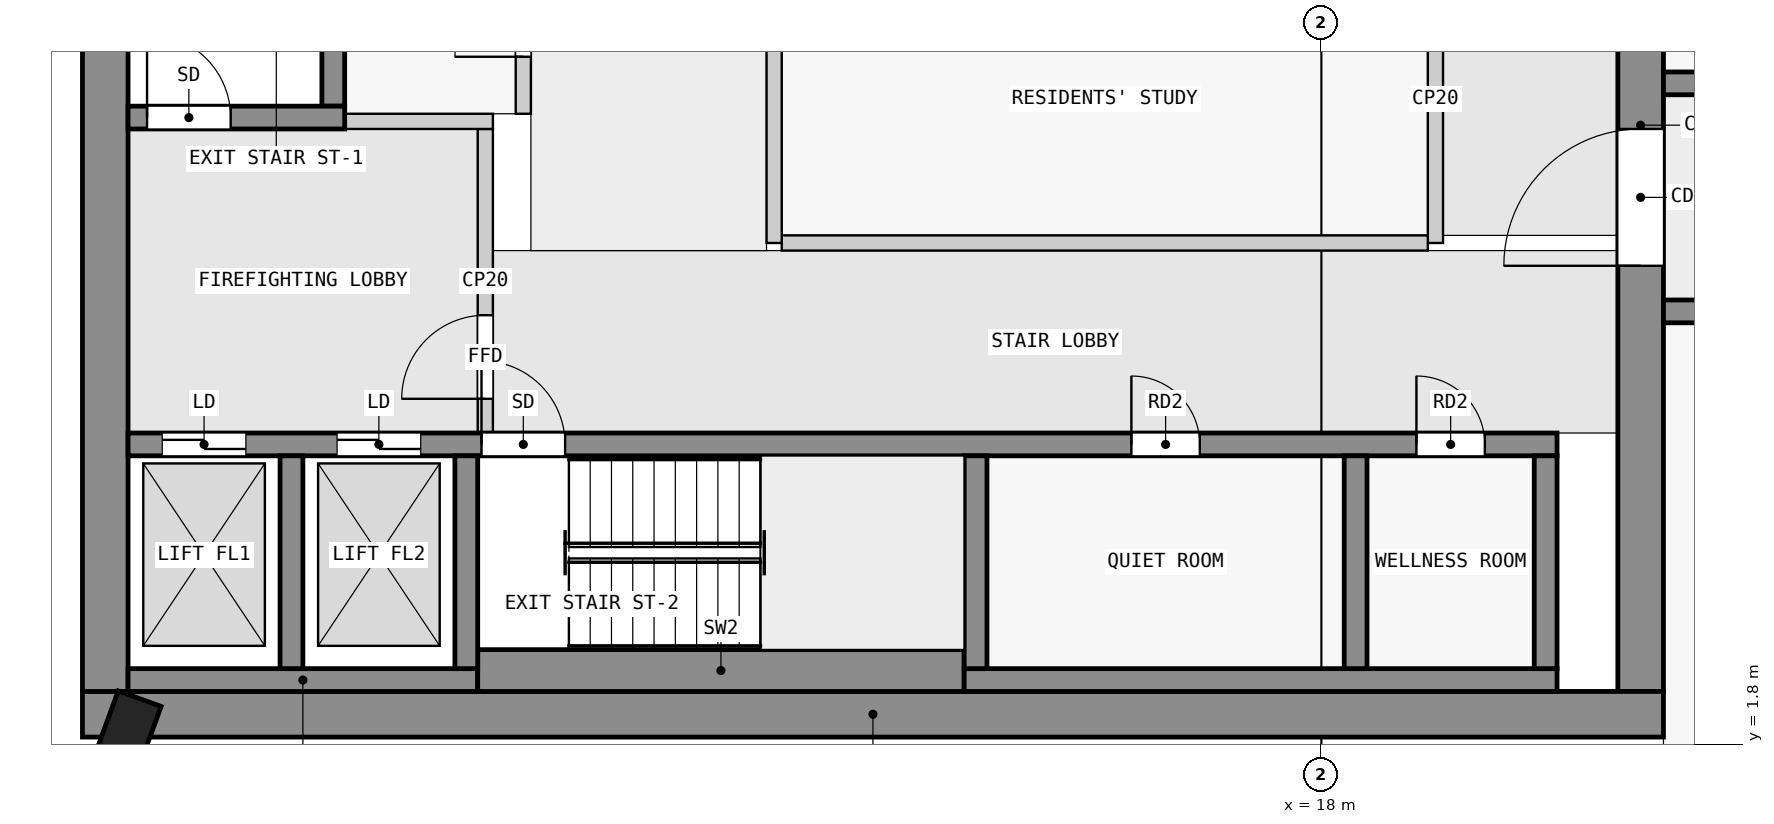
"""IFC4 building model, lengths in metres.
Left out: names, types, materials, properties, quantities, classifications, styles, units other than length and angle.
Written with IfcOpenShell. Run it as: python <this file> out.ifc"""

import sys

from ifc_helpers import new_model, si_unit, direction, frame, frame_2d, origin, origin_2d, place, context, subcontext, project, spatial, rectangle, extrude, element, fill, save


model = new_model("IFC4")
c1 = context("Model", 3, precision=1e-05, world=origin(), true_north=direction((0.0, 1.0)))
c2 = subcontext(c1, "Body", "Model", "MODEL_VIEW")
j1 = project(units=[si_unit("LENGTHUNIT", "METRE"), si_unit("PLANEANGLEUNIT", "RADIAN")], contexts=[c1])
p1 = place(None, origin())
s1 = spatial("IfcSite", under=j1, at=p1, CompositionType="ELEMENT")
p2 = place(p1, origin())
s2 = spatial("IfcBuilding", under=s1, at=p2, CompositionType="ELEMENT")
p3 = place(p2, frame((0.0, 0.0, 146.4)))
s3 = spatial("IfcBuildingStorey", under=s2, at=p3, CompositionType="ELEMENT", Elevation=146.4)
p4 = place(p3, frame((2.213, 1.748, 0.0), z_axis=(0.0, 0.0, 1.0), x_axis=(-0.939664280925, 0.342097996418, 0.0)))
e1 = element("IfcColumn", 1, at=p4, inside=s3, PredefinedType="COLUMN", context=c2, shape_type="SweptSolid", body=[
    extrude(rectangle(XDim=0.6, YDim=1.4, at=origin_2d()), origin(), (0.0, 0.0, 1.0), 3.5),
])
p5 = place(p3, frame((1.7, 2.2, 0.0), z_axis=(0.0, 0.0, 1.0), x_axis=(1.0, 0.0, 0.0)))
e2 = element("IfcWall", 2, at=p5, inside=s3, PredefinedType="SHEAR", context=c2, shape_type="SweptSolid", body=[
    extrude(rectangle(XDim=20.8, YDim=0.6, at=frame_2d((10.4, 0.0))), origin(), (0.0, 0.0, 1.0), 3.25),
])
p6 = place(p3, frame((2.0, 2.5, 0.0), z_axis=(0.0, 0.0, 1.0), x_axis=(0.0, 1.0, 0.0)))
e3 = element("IfcWall", 3, at=p6, inside=s3, PredefinedType="SHEAR", context=c2, shape_type="SweptSolid", body=[
    extrude(rectangle(XDim=14.9, YDim=0.6, at=frame_2d((7.45, 0.0))), origin(), (0.0, 0.0, 1.0), 3.25),
])
p7 = place(p3, frame((22.2, 2.5, 0.0), z_axis=(0.0, 0.0, 1.0), x_axis=(0.0, 1.0, 0.0)))
e4 = element("IfcWall", 4, at=p7, inside=s3, PredefinedType="SHEAR", context=c2, shape_type="SweptSolid", body=[
    extrude(rectangle(XDim=14.9, YDim=0.6, at=frame_2d((7.45, 0.0))), origin(), (0.0, 0.0, 1.0), 3.25),
])
p8 = place(p7, frame((5.6, 0.0, 0.0)))
e5 = element("IfcOpeningElement", 5, at=p8, cuts=e4, PredefinedType="OPENING", context=c2, shape_type="SweptSolid", body=[
    extrude(rectangle(XDim=1.8, YDim=2.1, at=frame_2d((0.9, 1.05))), frame((0.0, 0.31, 0.0), z_axis=(0.0, -1.0, 0.0), x_axis=(1.0, 0.0, 0.0)), (0.0, 0.0, 1.0), 0.62),
])
p9 = place(p3, frame((2.3, 2.65, 0.0), z_axis=(0.0, 0.0, 1.0), x_axis=(1.0, 0.0, 0.0)))
e6 = element("IfcWall", 6, at=p9, inside=s3, PredefinedType="SHEAR", context=c2, shape_type="SweptSolid", body=[
    extrude(rectangle(XDim=4.6, YDim=0.3, at=frame_2d((2.3, 0.0))), origin(), (0.0, 0.0, 1.0), 3.25),
])
p10 = place(p3, frame((6.9, 2.775, 0.0), z_axis=(0.0, 0.0, 1.0), x_axis=(1.0, 0.0, 0.0)))
e7 = element("IfcWall", 7, at=p10, inside=s3, PredefinedType="SHEAR", context=c2, shape_type="SweptSolid", body=[
    extrude(rectangle(XDim=6.4, YDim=0.55, at=frame_2d((3.2, 0.0))), origin(), (0.0, 0.0, 1.0), 3.25),
])
p11 = place(p3, frame((13.3, 2.65, 0.0), z_axis=(0.0, 0.0, 1.0), x_axis=(1.0, 0.0, 0.0)))
e8 = element("IfcWall", 8, at=p11, inside=s3, PredefinedType="SHEAR", context=c2, shape_type="SweptSolid", body=[
    extrude(rectangle(XDim=7.8, YDim=0.3, at=frame_2d((3.9, 0.0))), origin(), (0.0, 0.0, 1.0), 3.25),
])
for number, where, z_axis, x_axis in (
    (9, (4.45, 2.8, 0.0), (0.0, 0.0, 1.0), (0.0, 1.0, 0.0)),
    (10, (6.75, 2.8, 0.0), (0.0, 0.0, 1.0), (0.0, 1.0, 0.0)),
    (11, (13.45, 2.8, 0.0), (0.0, 0.0, 1.0), (0.0, 1.0, 0.0)),
    (12, (18.45, 2.8, 0.0), (0.0, 0.0, 1.0), (0.0, 1.0, 0.0)),
    (13, (20.95, 2.8, 0.0), (0.0, 0.0, 1.0), (0.0, 1.0, 0.0)),
):
    element("IfcWall", number, at=place(p3, frame(where, z_axis=z_axis, x_axis=x_axis)), inside=s3, PredefinedType="SHEAR", context=c2, shape_type="SweptSolid", body=[
        extrude(rectangle(XDim=2.8, YDim=0.3, at=frame_2d((1.4, 0.0))), origin(), (0.0, 0.0, 1.0), 3.25),
    ])
p12 = place(p3, frame((2.3, 5.75, 0.0), z_axis=(0.0, 0.0, 1.0), x_axis=(1.0, 0.0, 0.0)))
e14 = element("IfcWall", 14, at=p12, inside=s3, PredefinedType="SHEAR", context=c2, shape_type="SweptSolid", body=[
    extrude(rectangle(XDim=18.8, YDim=0.3, at=frame_2d((9.4, 0.0))), origin(), (0.0, 0.0, 1.0), 3.25),
])
p13 = place(p12, frame((4.65, 0.0, 0.0)))
e15 = element("IfcOpeningElement", 15, at=p13, cuts=e14, PredefinedType="OPENING", context=c2, shape_type="SweptSolid", body=[
    extrude(rectangle(XDim=1.1, YDim=2.1, at=frame_2d((0.55, 1.05))), frame((0.0, 0.16, 0.0), z_axis=(0.0, -1.0, 0.0), x_axis=(1.0, 0.0, 0.0)), (0.0, 0.0, 1.0), 0.32),
])
p14 = place(p12, frame((0.45, 0.0, 0.0)))
e16 = element("IfcOpeningElement", 16, at=p14, cuts=e14, PredefinedType="OPENING", context=c2, shape_type="SweptSolid", body=[
    extrude(rectangle(XDim=1.1, YDim=2.1, at=frame_2d((0.55, 1.05))), frame((0.0, 0.16, 0.0), z_axis=(0.0, -1.0, 0.0), x_axis=(1.0, 0.0, 0.0)), (0.0, 0.0, 1.0), 0.32),
])
p15 = place(p12, frame((2.75, 0.0, 0.0)))
e17 = element("IfcOpeningElement", 17, at=p15, cuts=e14, PredefinedType="OPENING", context=c2, shape_type="SweptSolid", body=[
    extrude(rectangle(XDim=1.1, YDim=2.1, at=frame_2d((0.55, 1.05))), frame((0.0, 0.16, 0.0), z_axis=(0.0, -1.0, 0.0), x_axis=(1.0, 0.0, 0.0)), (0.0, 0.0, 1.0), 0.32),
])
p16 = place(p12, frame((13.2, 0.0, 0.0)))
e18 = element("IfcOpeningElement", 18, at=p16, cuts=e14, PredefinedType="OPENING", context=c2, shape_type="SweptSolid", body=[
    extrude(rectangle(XDim=0.9, YDim=2.1, at=frame_2d((0.45, 1.05))), frame((0.0, 0.16, 0.0), z_axis=(0.0, -1.0, 0.0), x_axis=(1.0, 0.0, 0.0)), (0.0, 0.0, 1.0), 0.32),
])
p17 = place(p12, frame((16.95, 0.0, 0.0)))
e19 = element("IfcOpeningElement", 19, at=p17, cuts=e14, PredefinedType="OPENING", context=c2, shape_type="SweptSolid", body=[
    extrude(rectangle(XDim=0.9, YDim=2.1, at=frame_2d((0.45, 1.05))), frame((0.0, 0.16, 0.0), z_axis=(0.0, -1.0, 0.0), x_axis=(1.0, 0.0, 0.0)), (0.0, 0.0, 1.0), 0.32),
])
p18 = place(p3, frame((2.3, 10.05, 0.0), z_axis=(0.0, 0.0, 1.0), x_axis=(1.0, 0.0, 0.0)))
e20 = element("IfcWall", 20, at=p18, inside=s3, PredefinedType="SHEAR", context=c2, shape_type="SweptSolid", body=[
    extrude(rectangle(XDim=2.85, YDim=0.3, at=frame_2d((1.425, 0.0))), origin(), (0.0, 0.0, 1.0), 3.25),
])
p19 = place(p18, frame((0.25, 0.0, 0.0)))
e21 = element("IfcOpeningElement", 21, at=p19, cuts=e20, PredefinedType="OPENING", context=c2, shape_type="SweptSolid", body=[
    extrude(rectangle(XDim=1.1, YDim=2.1, at=frame_2d((0.55, 1.05))), frame((0.0, 0.16, 0.0), z_axis=(0.0, -1.0, 0.0), x_axis=(1.0, 0.0, 0.0)), (0.0, 0.0, 1.0), 0.32),
])
p20 = place(p3, frame((5.0, 10.2, 0.0), z_axis=(0.0, 0.0, 1.0), x_axis=(0.0, 1.0, 0.0)))
e22 = element("IfcWall", 22, at=p20, inside=s3, PredefinedType="SHEAR", context=c2, shape_type="SweptSolid", body=[
    extrude(rectangle(XDim=6.4, YDim=0.3, at=frame_2d((3.2, 0.0))), origin(), (0.0, 0.0, 1.0), 3.25),
])
p21 = place(p3, frame((22.5, 7.5, 0.0), z_axis=(0.0, 0.0, 1.0), x_axis=(1.0, 0.0, 0.0)))
e23 = element("IfcWall", 23, at=p21, inside=s3, PredefinedType="SHEAR", context=c2, shape_type="SweptSolid", body=[
    extrude(rectangle(XDim=22.5, YDim=0.3, at=frame_2d((11.25, 0.0))), origin(), (0.0, 0.0, 1.0), 3.25),
])
p22 = place(p21, frame((1.75, 0.0, 0.0)))
e24 = element("IfcOpeningElement", 24, at=p22, cuts=e23, PredefinedType="OPENING", context=c2, shape_type="SweptSolid", body=[
    extrude(rectangle(XDim=1.0, YDim=2.1, at=frame_2d((0.5, 1.05))), frame((0.0, 0.16, 0.0), z_axis=(0.0, -1.0, 0.0), x_axis=(1.0, 0.0, 0.0)), (0.0, 0.0, 1.0), 0.32),
])
p23 = place(p21, frame((6.25, 0.0, 0.0)))
e25 = element("IfcOpeningElement", 25, at=p23, cuts=e23, PredefinedType="OPENING", context=c2, shape_type="SweptSolid", body=[
    extrude(rectangle(XDim=1.0, YDim=2.1, at=frame_2d((0.5, 1.05))), frame((0.0, 0.16, 0.0), z_axis=(0.0, -1.0, 0.0), x_axis=(1.0, 0.0, 0.0)), (0.0, 0.0, 1.0), 0.32),
])
p24 = place(p21, frame((10.35, 0.0, 0.0)))
e26 = element("IfcOpeningElement", 26, at=p24, cuts=e23, PredefinedType="OPENING", context=c2, shape_type="SweptSolid", body=[
    extrude(rectangle(XDim=1.8, YDim=2.1, at=frame_2d((0.9, 1.05))), frame((0.0, 0.16, 0.0), z_axis=(0.0, -1.0, 0.0), x_axis=(1.0, 0.0, 0.0)), (0.0, 0.0, 1.0), 0.32),
])
p25 = place(p21, frame((16.85, 0.0, 0.0)))
e27 = element("IfcOpeningElement", 27, at=p25, cuts=e23, PredefinedType="OPENING", context=c2, shape_type="SweptSolid", body=[
    extrude(rectangle(XDim=1.0, YDim=2.1, at=frame_2d((0.5, 1.05))), frame((0.0, 0.16, 0.0), z_axis=(0.0, -1.0, 0.0), x_axis=(1.0, 0.0, 0.0)), (0.0, 0.0, 1.0), 0.32),
])
p26 = place(p3, frame((22.5, 10.5, 0.0), z_axis=(0.0, 0.0, 1.0), x_axis=(1.0, 0.0, 0.0)))
e28 = element("IfcWall", 28, at=p26, inside=s3, PredefinedType="SHEAR", context=c2, shape_type="SweptSolid", body=[
    extrude(rectangle(XDim=22.5, YDim=0.3, at=frame_2d((11.25, 0.0))), origin(), (0.0, 0.0, 1.0), 3.25),
])
p27 = place(p26, frame((4.05, 0.0, 0.0)))
e29 = element("IfcOpeningElement", 29, at=p27, cuts=e28, PredefinedType="OPENING", context=c2, shape_type="SweptSolid", body=[
    extrude(rectangle(XDim=1.0, YDim=2.1, at=frame_2d((0.5, 1.05))), frame((0.0, 0.16, 0.0), z_axis=(0.0, -1.0, 0.0), x_axis=(1.0, 0.0, 0.0)), (0.0, 0.0, 1.0), 0.32),
])
p28 = place(p26, frame((10.85, 0.0, 0.0)))
e30 = element("IfcOpeningElement", 30, at=p28, cuts=e28, PredefinedType="OPENING", context=c2, shape_type="SweptSolid", body=[
    extrude(rectangle(XDim=0.9, YDim=2.1, at=frame_2d((0.45, 1.05))), frame((0.0, 0.16, 0.0), z_axis=(0.0, -1.0, 0.0), x_axis=(1.0, 0.0, 0.0)), (0.0, 0.0, 1.0), 0.32),
])
p29 = place(p26, frame((15.25, 0.0, 0.0)))
e31 = element("IfcOpeningElement", 31, at=p29, cuts=e28, PredefinedType="OPENING", context=c2, shape_type="SweptSolid", body=[
    extrude(rectangle(XDim=1.0, YDim=2.1, at=frame_2d((0.5, 1.05))), frame((0.0, 0.16, 0.0), z_axis=(0.0, -1.0, 0.0), x_axis=(1.0, 0.0, 0.0)), (0.0, 0.0, 1.0), 0.32),
])
p30 = place(p26, frame((18.75, 0.0, 0.0)))
e32 = element("IfcOpeningElement", 32, at=p30, cuts=e28, PredefinedType="OPENING", context=c2, shape_type="SweptSolid", body=[
    extrude(rectangle(XDim=0.9, YDim=2.1, at=frame_2d((0.45, 1.05))), frame((0.0, 0.16, 0.0), z_axis=(0.0, -1.0, 0.0), x_axis=(1.0, 0.0, 0.0)), (0.0, 0.0, 1.0), 0.32),
])
p31 = place(p26, frame((20.95, 0.0, 0.0)))
e33 = element("IfcOpeningElement", 33, at=p31, cuts=e28, PredefinedType="OPENING", context=c2, shape_type="SweptSolid", body=[
    extrude(rectangle(XDim=1.0, YDim=2.1, at=frame_2d((0.5, 1.05))), frame((0.0, 0.16, 0.0), z_axis=(0.0, -1.0, 0.0), x_axis=(1.0, 0.0, 0.0)), (0.0, 0.0, 1.0), 0.32),
])
p32 = place(p3, frame((7.0, 5.9, 0.0), z_axis=(0.0, 0.0, 1.0), x_axis=(0.0, 1.0, 0.0)))
e34 = element("IfcWall", 34, at=p32, inside=s3, PredefinedType="PARTITIONING", context=c2, shape_type="SweptSolid", body=[
    extrude(rectangle(XDim=4.0, YDim=0.2, at=frame_2d((2.0, 0.0))), origin(), (0.0, 0.0, 1.0), 3.25),
])
p33 = place(p32, frame((0.45, 0.0, 0.0)))
e35 = element("IfcOpeningElement", 35, at=p33, cuts=e34, PredefinedType="OPENING", context=c2, shape_type="SweptSolid", body=[
    extrude(rectangle(XDim=1.1, YDim=2.1, at=frame_2d((0.55, 1.05))), frame((0.0, 0.11, 0.0), z_axis=(0.0, -1.0, 0.0), x_axis=(1.0, 0.0, 0.0)), (0.0, 0.0, 1.0), 0.22),
])
p34 = place(p3, frame((5.15, 10.0, 0.0), z_axis=(0.0, 0.0, 1.0), x_axis=(1.0, 0.0, 0.0)))
e36 = element("IfcWall", 36, at=p34, inside=s3, PredefinedType="PARTITIONING", context=c2, shape_type="SweptSolid", body=[
    extrude(rectangle(XDim=1.95, YDim=0.2, at=frame_2d((0.975, 0.0))), origin(), (0.0, 0.0, 1.0), 3.25),
])
p35 = place(p3, frame((10.8, 8.4, 0.0), z_axis=(0.0, 0.0, 1.0), x_axis=(0.0, 1.0, 0.0)))
e37 = element("IfcWall", 37, at=p35, inside=s3, PredefinedType="PARTITIONING", context=c2, shape_type="SweptSolid", body=[
    extrude(rectangle(XDim=3.8, YDim=0.2, at=frame_2d((1.9, 0.0))), origin(), (0.0, 0.0, 1.0), 3.25),
])
p36 = place(p3, frame((10.9, 8.4, 0.0), z_axis=(0.0, 0.0, 1.0), x_axis=(1.0, 0.0, 0.0)))
e38 = element("IfcWall", 38, at=p36, inside=s3, PredefinedType="PARTITIONING", context=c2, shape_type="SweptSolid", body=[
    extrude(rectangle(XDim=8.5, YDim=0.2, at=frame_2d((4.25, 0.0))), origin(), (0.0, 0.0, 1.0), 3.25),
])
p37 = place(p3, frame((19.5, 8.4, 0.0), z_axis=(0.0, 0.0, 1.0), x_axis=(0.0, 1.0, 0.0)))
e39 = element("IfcWall", 39, at=p37, inside=s3, PredefinedType="PARTITIONING", context=c2, shape_type="SweptSolid", body=[
    extrude(rectangle(XDim=3.8, YDim=0.2, at=frame_2d((1.9, 0.0))), origin(), (0.0, 0.0, 1.0), 3.25),
])
p38 = place(p3, frame((7.5, 10.1, 0.0), z_axis=(0.0, 0.0, 1.0), x_axis=(0.0, 1.0, 0.0)))
e40 = element("IfcWall", 40, at=p38, inside=s3, PredefinedType="PARTITIONING", context=c2, shape_type="SweptSolid", body=[
    extrude(rectangle(XDim=7.3, YDim=0.2, at=frame_2d((3.65, 0.0))), origin(), (0.0, 0.0, 1.0), 3.25),
])
p39 = place(p38, frame((0.75, 0.0, 0.0)))
e41 = element("IfcOpeningElement", 41, at=p39, cuts=e40, PredefinedType="OPENING", context=c2, shape_type="SweptSolid", body=[
    extrude(rectangle(XDim=0.9, YDim=2.1, at=frame_2d((0.45, 1.05))), frame((0.0, 0.11, 0.0), z_axis=(0.0, -1.0, 0.0), x_axis=(1.0, 0.0, 0.0)), (0.0, 0.0, 1.0), 0.22),
])
p40 = place(p38, frame((4.4, 0.0, 0.0)))
e42 = element("IfcOpeningElement", 42, at=p40, cuts=e40, PredefinedType="OPENING", context=c2, shape_type="SweptSolid", body=[
    extrude(rectangle(XDim=0.9, YDim=2.1, at=frame_2d((0.45, 1.05))), frame((0.0, 0.11, 0.0), z_axis=(0.0, -1.0, 0.0), x_axis=(1.0, 0.0, 0.0)), (0.0, 0.0, 1.0), 0.22),
])
p41 = place(p33, origin())
e43 = element("IfcDoor", 43, at=p41, inside=s3, OperationType="SINGLE_SWING_LEFT", PredefinedType="DOOR", context=c2, shape_type="SweptSolid", body=[
    extrude(rectangle(XDim=1.1, YDim=2.1, at=frame_2d((0.55, 1.05))), frame((0.0, 0.025, 0.0), z_axis=(0.0, -1.0, 0.0), x_axis=(1.0, 0.0, 0.0)), (0.0, 0.0, 1.0), 0.05),
])
fill(e35, e43)
p42 = place(p19, origin())
e44 = element("IfcDoor", 44, at=p42, inside=s3, OperationType="SINGLE_SWING_RIGHT", PredefinedType="DOOR", context=c2, shape_type="SweptSolid", body=[
    extrude(rectangle(XDim=1.1, YDim=2.1, at=frame_2d((0.55, 1.05))), frame((0.0, 0.025, 0.0), z_axis=(0.0, -1.0, 0.0), x_axis=(1.0, 0.0, 0.0)), (0.0, 0.0, 1.0), 0.05),
])
fill(e21, e44)
p43 = place(p13, origin())
e45 = element("IfcDoor", 45, at=p43, inside=s3, OperationType="SINGLE_SWING_LEFT", PredefinedType="DOOR", context=c2, shape_type="SweptSolid", body=[
    extrude(rectangle(XDim=1.1, YDim=2.1, at=frame_2d((0.55, 1.05))), frame((0.0, 0.025, 0.0), z_axis=(0.0, -1.0, 0.0), x_axis=(1.0, 0.0, 0.0)), (0.0, 0.0, 1.0), 0.05),
])
fill(e15, e45)
p44 = place(p14, origin())
e46 = element("IfcDoor", 46, at=p44, inside=s3, OperationType="DOUBLE_DOOR_SLIDING", PredefinedType="DOOR", context=c2, shape_type="SweptSolid", body=[
    extrude(rectangle(XDim=1.1, YDim=2.1, at=frame_2d((0.55, 1.05))), frame((0.0, 0.025, 0.0), z_axis=(0.0, -1.0, 0.0), x_axis=(1.0, 0.0, 0.0)), (0.0, 0.0, 1.0), 0.05),
])
fill(e16, e46)
p45 = place(p15, origin())
e47 = element("IfcDoor", 47, at=p45, inside=s3, OperationType="DOUBLE_DOOR_SLIDING", PredefinedType="DOOR", context=c2, shape_type="SweptSolid", body=[
    extrude(rectangle(XDim=1.1, YDim=2.1, at=frame_2d((0.55, 1.05))), frame((0.0, 0.025, 0.0), z_axis=(0.0, -1.0, 0.0), x_axis=(1.0, 0.0, 0.0)), (0.0, 0.0, 1.0), 0.05),
])
fill(e17, e47)
p46 = place(p8, origin())
e48 = element("IfcDoor", 48, at=p46, inside=s3, OperationType="DOUBLE_DOOR_SINGLE_SWING", PredefinedType="DOOR", context=c2, shape_type="SweptSolid", body=[
    extrude(rectangle(XDim=1.8, YDim=2.1, at=frame_2d((0.9, 1.05))), frame((0.0, 0.025, 0.0), z_axis=(0.0, -1.0, 0.0), x_axis=(1.0, 0.0, 0.0)), (0.0, 0.0, 1.0), 0.05),
])
fill(e5, e48)
p47 = place(p39, origin())
e49 = element("IfcDoor", 49, at=p47, inside=s3, OperationType="SINGLE_SWING_RIGHT", PredefinedType="DOOR", context=c2, shape_type="SweptSolid", body=[
    extrude(rectangle(XDim=0.9, YDim=2.1, at=frame_2d((0.45, 1.05))), frame((0.0, 0.025, 0.0), z_axis=(0.0, -1.0, 0.0), x_axis=(1.0, 0.0, 0.0)), (0.0, 0.0, 1.0), 0.05),
])
fill(e41, e49)
p48 = place(p16, origin())
e50 = element("IfcDoor", 50, at=p48, inside=s3, OperationType="SINGLE_SWING_LEFT", PredefinedType="DOOR", context=c2, shape_type="SweptSolid", body=[
    extrude(rectangle(XDim=0.9, YDim=2.1, at=frame_2d((0.45, 1.05))), frame((0.0, 0.025, 0.0), z_axis=(0.0, -1.0, 0.0), x_axis=(1.0, 0.0, 0.0)), (0.0, 0.0, 1.0), 0.05),
])
fill(e18, e50)
p49 = place(p17, origin())
e51 = element("IfcDoor", 51, at=p49, inside=s3, OperationType="SINGLE_SWING_LEFT", PredefinedType="DOOR", context=c2, shape_type="SweptSolid", body=[
    extrude(rectangle(XDim=0.9, YDim=2.1, at=frame_2d((0.45, 1.05))), frame((0.0, 0.025, 0.0), z_axis=(0.0, -1.0, 0.0), x_axis=(1.0, 0.0, 0.0)), (0.0, 0.0, 1.0), 0.05),
])
fill(e19, e51)
save(model, sys.argv[1])
